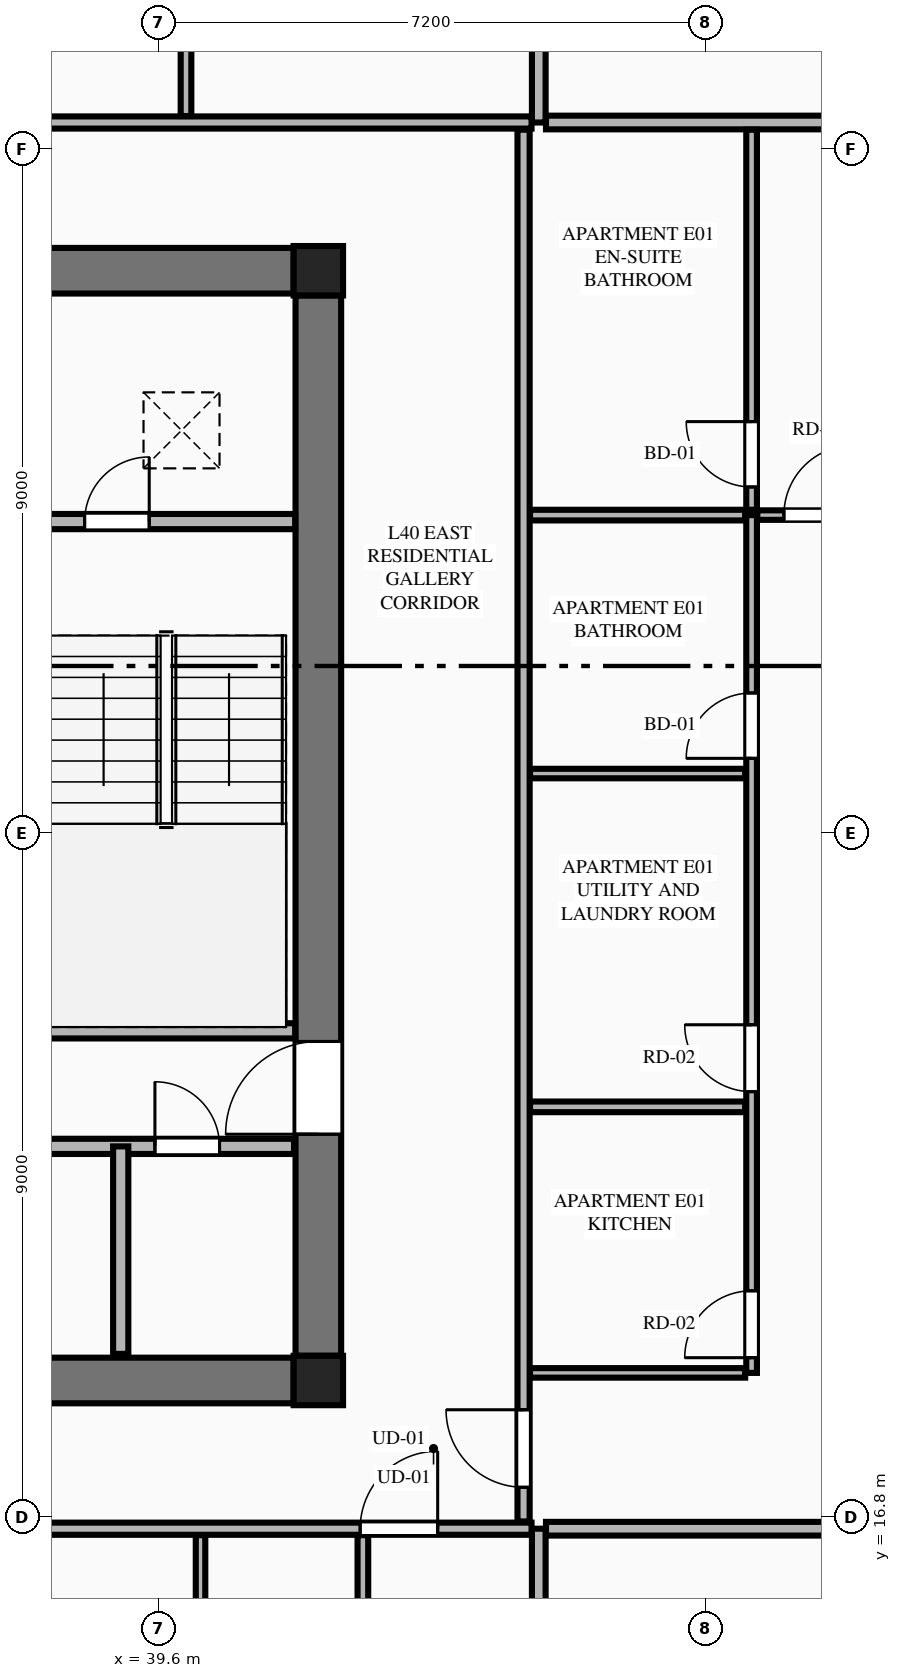
"""IFC4 building model, lengths in metres.
Left out: names, types, materials, properties, quantities, classifications, styles, units other than length and angle.
Written with IfcOpenShell. Run it as: python <this file> out.ifc"""

import sys

from ifc_helpers import new_model, si_unit, direction, frame, frame_2d, origin, origin_2d, place, context, subcontext, project, spatial, rectangle, extrude, element, fill, save


model = new_model("IFC4")
c1 = context("Model", 3, precision=1e-05, world=origin(), true_north=direction((0.0, 1.0)))
c2 = subcontext(c1, "Body", "Model", "MODEL_VIEW")
j1 = project(units=[si_unit("LENGTHUNIT", "METRE"), si_unit("PLANEANGLEUNIT", "RADIAN")], contexts=[c1])
p1 = place(None, origin())
s1 = spatial("IfcSite", under=j1, at=p1, CompositionType="ELEMENT")
p2 = place(p1, origin())
s2 = spatial("IfcBuilding", under=s1, at=p2, CompositionType="ELEMENT")
p3 = place(p2, frame((0.0, 0.0, 153.5)))
s3 = spatial("IfcBuildingStorey", under=s2, at=p3, CompositionType="ELEMENT", Elevation=153.5)
for number, where, z_axis, x_axis in (
    (1, (41.7, 18.6, 0.0), (0.0, 0.0, 1.0), (1.0, 0.0, 0.0)),
    (2, (41.7, 33.2, 0.0), (0.0, 0.0, 1.0), (1.0, 0.0, 0.0)),
):
    element("IfcColumn", number, at=place(p3, frame(where, z_axis=z_axis, x_axis=x_axis)), inside=s3, PredefinedType="COLUMN", context=c2, shape_type="SweptSolid", body=[
        extrude(rectangle(XDim=0.65, YDim=0.65, at=origin_2d()), origin(), (0.0, 0.0, 1.0), 3.55),
    ])
for number, where, z_axis, x_axis in (
    (3, (23.425, 18.6, 0.0), (0.0, 0.0, 1.0), (1.0, 0.0, 0.0)),
    (4, (23.425, 33.2, 0.0), (0.0, 0.0, 1.0), (1.0, 0.0, 0.0)),
):
    element("IfcWall", number, at=place(p3, frame(where, z_axis=z_axis, x_axis=x_axis)), inside=s3, PredefinedType="SHEAR", context=c2, shape_type="SweptSolid", body=[
        extrude(rectangle(XDim=17.95, YDim=0.6, at=frame_2d((8.975, 0.0))), origin(), (0.0, 0.0, 1.0), 3.34),
    ])
p4 = place(p3, frame((41.7, 18.925, 0.0), z_axis=(0.0, 0.0, 1.0), x_axis=(0.0, 1.0, 0.0)))
e5 = element("IfcWall", 5, at=p4, inside=s3, PredefinedType="SHEAR", context=c2, shape_type="SweptSolid", body=[
    extrude(rectangle(XDim=13.95, YDim=0.6, at=frame_2d((6.975, 0.0))), origin(), (0.0, 0.0, 1.0), 3.34),
])
p5 = place(p4, frame((2.915, 0.0, 0.0)))
e6 = element("IfcOpeningElement", 6, at=p5, cuts=e5, PredefinedType="OPENING", context=c2, shape_type="SweptSolid", body=[
    extrude(rectangle(XDim=1.22, YDim=2.25, at=frame_2d((0.61, 1.125))), frame((0.0, 0.31, 0.0), z_axis=(0.0, -1.0, 0.0), x_axis=(1.0, 0.0, 0.0)), (0.0, 0.0, 1.0), 0.62),
])
p6 = place(p3, frame((38.125, 23.2, 0.0), z_axis=(0.0, 0.0, 1.0), x_axis=(1.0, 0.0, 0.0)))
e7 = element("IfcWall", 7, at=p6, inside=s3, PredefinedType="PLUMBINGWALL", context=c2, shape_type="SweptSolid", body=[
    extrude(rectangle(XDim=3.27, YDim=0.2, at=frame_2d((1.635, 0.0))), origin(), (0.0, 0.0, 1.0), 3.34),
])
p7 = place(p3, frame((38.125, 29.9, 0.0), z_axis=(0.0, 0.0, 1.0), x_axis=(1.0, 0.0, 0.0)))
e8 = element("IfcWall", 8, at=p7, inside=s3, PredefinedType="PLUMBINGWALL", context=c2, shape_type="SweptSolid", body=[
    extrude(rectangle(XDim=3.27, YDim=0.2, at=frame_2d((1.635, 0.0))), origin(), (0.0, 0.0, 1.0), 3.34),
])
p8 = place(p7, frame((0.5, 0.0, 0.0)))
e9 = element("IfcOpeningElement", 9, at=p8, cuts=e8, PredefinedType="OPENING", context=c2, shape_type="SweptSolid", body=[
    extrude(rectangle(XDim=0.85, YDim=2.05, at=frame_2d((0.425, 1.025))), frame((0.0, 0.11, 0.0), z_axis=(0.0, -1.0, 0.0), x_axis=(1.0, 0.0, 0.0)), (0.0, 0.0, 1.0), 0.22),
])
p9 = place(p3, frame((23.42, 21.68, 0.0), z_axis=(0.0, 0.0, 1.0), x_axis=(1.0, 0.0, 0.0)))
e10 = element("IfcWall", 10, at=p9, inside=s3, PredefinedType="PLUMBINGWALL", context=c2, shape_type="SweptSolid", body=[
    extrude(rectangle(XDim=17.96, YDim=0.2, at=frame_2d((8.98, 0.0))), origin(), (0.0, 0.0, 1.0), 3.34),
])
p10 = place(p9, frame((11.6, 0.0, 0.0)))
e11 = element("IfcOpeningElement", 11, at=p10, cuts=e10, PredefinedType="OPENING", context=c2, shape_type="SweptSolid", body=[
    extrude(rectangle(XDim=1.1, YDim=2.2, at=frame_2d((0.55, 1.1))), frame((0.0, 0.11, 0.0), z_axis=(0.0, -1.0, 0.0), x_axis=(1.0, 0.0, 0.0)), (0.0, 0.0, 1.0), 0.22),
])
p11 = place(p9, frame((0.41, 0.0, 0.0)))
e12 = element("IfcOpeningElement", 12, at=p11, cuts=e10, PredefinedType="OPENING", context=c2, shape_type="SweptSolid", body=[
    extrude(rectangle(XDim=0.85, YDim=2.05, at=frame_2d((0.425, 1.025))), frame((0.0, 0.11, 0.0), z_axis=(0.0, -1.0, 0.0), x_axis=(1.0, 0.0, 0.0)), (0.0, 0.0, 1.0), 0.22),
])
p12 = place(p9, frame((4.13, 0.0, 0.0)))
e13 = element("IfcOpeningElement", 13, at=p12, cuts=e10, PredefinedType="OPENING", context=c2, shape_type="SweptSolid", body=[
    extrude(rectangle(XDim=0.85, YDim=2.05, at=frame_2d((0.425, 1.025))), frame((0.0, 0.11, 0.0), z_axis=(0.0, -1.0, 0.0), x_axis=(1.0, 0.0, 0.0)), (0.0, 0.0, 1.0), 0.22),
])
p13 = place(p9, frame((7.83, 0.0, 0.0)))
e14 = element("IfcOpeningElement", 14, at=p13, cuts=e10, PredefinedType="OPENING", context=c2, shape_type="SweptSolid", body=[
    extrude(rectangle(XDim=0.85, YDim=2.05, at=frame_2d((0.425, 1.025))), frame((0.0, 0.11, 0.0), z_axis=(0.0, -1.0, 0.0), x_axis=(1.0, 0.0, 0.0)), (0.0, 0.0, 1.0), 0.22),
])
p14 = place(p9, frame((13.78, 0.0, 0.0)))
e15 = element("IfcOpeningElement", 15, at=p14, cuts=e10, PredefinedType="OPENING", context=c2, shape_type="SweptSolid", body=[
    extrude(rectangle(XDim=0.85, YDim=2.05, at=frame_2d((0.425, 1.025))), frame((0.0, 0.11, 0.0), z_axis=(0.0, -1.0, 0.0), x_axis=(1.0, 0.0, 0.0)), (0.0, 0.0, 1.0), 0.22),
])
p15 = place(p9, frame((16.13, 0.0, 0.0)))
e16 = element("IfcOpeningElement", 16, at=p15, cuts=e10, PredefinedType="OPENING", context=c2, shape_type="SweptSolid", body=[
    extrude(rectangle(XDim=0.85, YDim=2.05, at=frame_2d((0.425, 1.025))), frame((0.0, 0.11, 0.0), z_axis=(0.0, -1.0, 0.0), x_axis=(1.0, 0.0, 0.0)), (0.0, 0.0, 1.0), 0.22),
])
p16 = place(p3, frame((39.1, 18.95, 0.0), z_axis=(0.0, 0.0, 1.0), x_axis=(0.0, 1.0, 0.0)))
e17 = element("IfcWall", 17, at=p16, inside=s3, PredefinedType="PLUMBINGWALL", context=c2, shape_type="SweptSolid", body=[
    extrude(rectangle(XDim=2.73, YDim=0.2, at=frame_2d((1.365, 0.0))), origin(), (0.0, 0.0, 1.0), 3.34),
])
p17 = place(p3, frame((44.6, 4.105, 0.0), z_axis=(0.0, 0.0, 1.0), x_axis=(0.0, 1.0, 0.0)))
e18 = element("IfcWall", 18, at=p17, inside=s3, PredefinedType="PARTITIONING", context=c2, shape_type="SweptSolid", body=[
    extrude(rectangle(XDim=12.545, YDim=0.18, at=frame_2d((6.272, 0.0))), origin(), (0.0, 0.0, 1.0), 3.34),
])
p18 = place(p3, frame((36.327, 16.65, 0.0), z_axis=(0.0, 0.0, 1.0), x_axis=(1.0, 0.0, 0.0)))
e19 = element("IfcWall", 19, at=p18, inside=s3, PredefinedType="PARTITIONING", context=c2, shape_type="SweptSolid", body=[
    extrude(rectangle(XDim=8.178, YDim=0.16, at=frame_2d((4.089, 0.0))), origin(), (0.0, 0.0, 1.0), 3.34),
])
p19 = place(p18, frame((5.923, 0.0, 0.0)))
e20 = element("IfcOpeningElement", 20, at=p19, cuts=e19, PredefinedType="OPENING", context=c2, shape_type="SweptSolid", body=[
    extrude(rectangle(XDim=1.02, YDim=2.25, at=frame_2d((0.51, 1.125))), frame((0.0, 0.09, 0.0), z_axis=(0.0, -1.0, 0.0), x_axis=(1.0, 0.0, 0.0)), (0.0, 0.0, 1.0), 0.18),
])
p20 = place(p3, frame((40.15, 9.981, 0.0), z_axis=(0.0, 0.0, 1.0), x_axis=(0.0, 1.0, 0.0)))
e21 = element("IfcWall", 21, at=p20, inside=s3, PredefinedType="PARTITIONING", context=c2, shape_type="SweptSolid", body=[
    extrude(rectangle(XDim=6.584, YDim=0.125, at=frame_2d((3.292, 0.0))), origin(), (0.0, 0.0, 1.0), 3.34),
])
p21 = place(p3, frame((42.286, 9.981, 0.0), z_axis=(0.0, 0.0, 1.0), x_axis=(0.0, 1.0, 0.0)))
e22 = element("IfcWall", 22, at=p21, inside=s3, PredefinedType="PLUMBINGWALL", context=c2, shape_type="SweptSolid", body=[
    extrude(rectangle(XDim=6.584, YDim=0.14, at=frame_2d((3.292, 0.0))), origin(), (0.0, 0.0, 1.0), 2.722),
])
p22 = place(p3, frame((44.6, 35.15, 0.0), z_axis=(0.0, 0.0, 1.0), x_axis=(0.0, 1.0, 0.0)))
e23 = element("IfcWall", 23, at=p22, inside=s3, PredefinedType="PARTITIONING", context=c2, shape_type="SweptSolid", body=[
    extrude(rectangle(XDim=12.345, YDim=0.18, at=frame_2d((6.173, 0.0))), origin(), (0.0, 0.0, 1.0), 3.34),
])
p23 = place(p3, frame((20.295, 35.15, 0.0), z_axis=(0.0, 0.0, 1.0), x_axis=(1.0, 0.0, 0.0)))
e24 = element("IfcWall", 24, at=p23, inside=s3, PredefinedType="PARTITIONING", context=c2, shape_type="SweptSolid", body=[
    extrude(rectangle(XDim=24.21, YDim=0.16, at=frame_2d((12.105, 0.0))), origin(), (0.0, 0.0, 1.0), 3.34),
])
p24 = place(p23, frame((0.405, 0.0, 0.0)))
e25 = element("IfcOpeningElement", 25, at=p24, cuts=e24, PredefinedType="OPENING", context=c2, shape_type="SweptSolid", body=[
    extrude(rectangle(XDim=1.35, YDim=2.35, at=frame_2d((0.675, 1.175))), frame((0.0, 0.09, 0.0), z_axis=(0.0, -1.0, 0.0), x_axis=(1.0, 0.0, 0.0)), (0.0, 0.0, 1.0), 0.18),
])
p25 = place(p3, frame((39.959, 35.235, 0.0), z_axis=(0.0, 0.0, 1.0), x_axis=(0.0, 1.0, 0.0)))
e26 = element("IfcWall", 26, at=p25, inside=s3, PredefinedType="PLUMBINGWALL", context=c2, shape_type="SweptSolid", body=[
    extrude(rectangle(XDim=4.625, YDim=0.14, at=frame_2d((2.312, 0.0))), origin(), (0.0, 0.0, 1.0), 3.34),
])
p26 = place(p3, frame((44.695, 16.65, 0.0), z_axis=(0.0, 0.0, 1.0), x_axis=(1.0, 0.0, 0.0)))
e27 = element("IfcWall", 27, at=p26, inside=s3, PredefinedType="PARTITIONING", context=c2, shape_type="SweptSolid", body=[
    extrude(rectangle(XDim=7.996, YDim=0.18, at=frame_2d((3.998, 0.0))), origin(), (0.0, 0.0, 1.0), 3.34),
])
p27 = place(p3, frame((44.695, 35.15, 0.0), z_axis=(0.0, 0.0, 1.0), x_axis=(1.0, 0.0, 0.0)))
e28 = element("IfcWall", 28, at=p27, inside=s3, PredefinedType="PARTITIONING", context=c2, shape_type="SweptSolid", body=[
    extrude(rectangle(XDim=7.895, YDim=0.18, at=frame_2d((3.948, 0.0))), origin(), (0.0, 0.0, 1.0), 3.34),
])
p28 = place(p3, frame((44.4, 16.745, 0.0), z_axis=(0.0, 0.0, 1.0), x_axis=(0.0, 1.0, 0.0)))
e29 = element("IfcWall", 29, at=p28, inside=s3, PredefinedType="PARTITIONING", context=c2, shape_type="SweptSolid", body=[
    extrude(rectangle(XDim=18.31, YDim=0.16, at=frame_2d((9.155, 0.0))), origin(), (0.0, 0.0, 1.0), 3.34),
])
p29 = place(p28, frame((0.45, 0.0, 0.0)))
e30 = element("IfcOpeningElement", 30, at=p29, cuts=e29, PredefinedType="OPENING", context=c2, shape_type="SweptSolid", body=[
    extrude(rectangle(XDim=1.02, YDim=2.25, at=frame_2d((0.51, 1.125))), frame((0.0, 0.09, 0.0), z_axis=(0.0, -1.0, 0.0), x_axis=(1.0, 0.0, 0.0)), (0.0, 0.0, 1.0), 0.18),
])
p30 = place(p3, frame((44.485, 18.7, 0.0), z_axis=(0.0, 0.0, 1.0), x_axis=(1.0, 0.0, 0.0)))
e31 = element("IfcWall", 31, at=p30, inside=s3, PredefinedType="PARTITIONING", context=c2, shape_type="SweptSolid", body=[
    extrude(rectangle(XDim=2.83, YDim=0.125, at=frame_2d((1.415, 0.0))), origin(), (0.0, 0.0, 1.0), 2.722),
])
p31 = place(p3, frame((47.4, 18.7, 0.0), z_axis=(0.0, 0.0, 1.0), x_axis=(0.0, 1.0, 0.0)))
e32 = element("IfcWall", 32, at=p31, inside=s3, PredefinedType="PLUMBINGWALL", context=c2, shape_type="SweptSolid", body=[
    extrude(rectangle(XDim=11.285, YDim=0.14, at=frame_2d((5.643, 0.0))), origin(), (0.0, 0.0, 1.0), 3.34),
])
p32 = place(p31, frame((0.2, 0.0, 0.0)))
e33 = element("IfcOpeningElement", 33, at=p32, cuts=e32, PredefinedType="OPENING", context=c2, shape_type="SweptSolid", body=[
    extrude(rectangle(XDim=0.88, YDim=2.15, at=frame_2d((0.44, 1.075))), frame((0.0, 0.08, 0.0), z_axis=(0.0, -1.0, 0.0), x_axis=(1.0, 0.0, 0.0)), (0.0, 0.0, 1.0), 0.16),
])
p33 = place(p31, frame((3.7, 0.0, 0.0)))
e34 = element("IfcOpeningElement", 34, at=p33, cuts=e32, PredefinedType="OPENING", context=c2, shape_type="SweptSolid", body=[
    extrude(rectangle(XDim=0.88, YDim=2.15, at=frame_2d((0.44, 1.075))), frame((0.0, 0.08, 0.0), z_axis=(0.0, -1.0, 0.0), x_axis=(1.0, 0.0, 0.0)), (0.0, 0.0, 1.0), 0.16),
])
p34 = place(p31, frame((8.085, 0.0, 0.0)))
e35 = element("IfcOpeningElement", 35, at=p34, cuts=e32, PredefinedType="OPENING", context=c2, shape_type="SweptSolid", body=[
    extrude(rectangle(XDim=0.86, YDim=2.1, at=frame_2d((0.43, 1.05))), frame((0.0, 0.08, 0.0), z_axis=(0.0, -1.0, 0.0), x_axis=(1.0, 0.0, 0.0)), (0.0, 0.0, 1.0), 0.16),
])
p35 = place(p3, frame((47.4, 30.055, 0.0), z_axis=(0.0, 0.0, 1.0), x_axis=(0.0, 1.0, 0.0)))
e36 = element("IfcWall", 36, at=p35, inside=s3, PredefinedType="PLUMBINGWALL", context=c2, shape_type="SweptSolid", body=[
    extrude(rectangle(XDim=5.0, YDim=0.14, at=frame_2d((2.5, 0.0))), origin(), (0.0, 0.0, 1.0), 3.34),
])
p36 = place(p35, frame((0.3, 0.0, 0.0)))
e37 = element("IfcOpeningElement", 37, at=p36, cuts=e36, PredefinedType="OPENING", context=c2, shape_type="SweptSolid", body=[
    extrude(rectangle(XDim=0.86, YDim=2.1, at=frame_2d((0.43, 1.05))), frame((0.0, 0.08, 0.0), z_axis=(0.0, -1.0, 0.0), x_axis=(1.0, 0.0, 0.0)), (0.0, 0.0, 1.0), 0.16),
])
p37 = place(p3, frame((44.485, 29.985, 0.0), z_axis=(0.0, 0.0, 1.0), x_axis=(1.0, 0.0, 0.0)))
e38 = element("IfcWall", 38, at=p37, inside=s3, PredefinedType="PLUMBINGWALL", context=c2, shape_type="SweptSolid", body=[
    extrude(rectangle(XDim=2.83, YDim=0.14, at=frame_2d((1.415, 0.0))), origin(), (0.0, 0.0, 1.0), 3.34),
])
p38 = place(p3, frame((47.475, 29.985, 0.0), z_axis=(0.0, 0.0, 1.0), x_axis=(1.0, 0.0, 0.0)))
e39 = element("IfcWall", 39, at=p38, inside=s3, PredefinedType="PARTITIONING", context=c2, shape_type="SweptSolid", body=[
    extrude(rectangle(XDim=7.743, YDim=0.125, at=frame_2d((3.872, 0.0))), origin(), (0.0, 0.0, 1.0), 3.34),
])
p39 = place(p38, frame((0.35, 0.0, 0.0)))
e40 = element("IfcOpeningElement", 40, at=p39, cuts=e39, PredefinedType="OPENING", context=c2, shape_type="SweptSolid", body=[
    extrude(rectangle(XDim=0.92, YDim=2.15, at=frame_2d((0.46, 1.075))), frame((0.0, 0.073, 0.0), z_axis=(0.0, -1.0, 0.0), x_axis=(1.0, 0.0, 0.0)), (0.0, 0.0, 1.0), 0.145),
])
p40 = place(p3, frame((44.485, 22.2, 0.0), z_axis=(0.0, 0.0, 1.0), x_axis=(1.0, 0.0, 0.0)))
e41 = element("IfcWall", 41, at=p40, inside=s3, PredefinedType="PLUMBINGWALL", context=c2, shape_type="SweptSolid", body=[
    extrude(rectangle(XDim=2.83, YDim=0.14, at=frame_2d((1.415, 0.0))), origin(), (0.0, 0.0, 1.0), 3.34),
])
p41 = place(p3, frame((44.485, 26.585, 0.0), z_axis=(0.0, 0.0, 1.0), x_axis=(1.0, 0.0, 0.0)))
e42 = element("IfcWall", 42, at=p41, inside=s3, PredefinedType="PARTITIONING", context=c2, shape_type="SweptSolid", body=[
    extrude(rectangle(XDim=2.83, YDim=0.125, at=frame_2d((1.415, 0.0))), origin(), (0.0, 0.0, 1.0), 3.34),
])
p42 = place(p5, origin())
e43 = element("IfcDoor", 43, at=p42, inside=s3, OperationType="SINGLE_SWING_LEFT", PredefinedType="DOOR", context=c2, shape_type="SweptSolid", body=[
    extrude(rectangle(XDim=1.22, YDim=2.25, at=frame_2d((0.61, 1.125))), frame((0.0, 0.025, 0.0), z_axis=(0.0, -1.0, 0.0), x_axis=(1.0, 0.0, 0.0)), (0.0, 0.0, 1.0), 0.05),
])
fill(e6, e43)
p43 = place(p8, origin())
e44 = element("IfcDoor", 44, at=p43, inside=s3, OperationType="SINGLE_SWING_RIGHT", PredefinedType="DOOR", context=c2, shape_type="SweptSolid", body=[
    extrude(rectangle(XDim=0.85, YDim=2.05, at=frame_2d((0.425, 1.025))), frame((0.0, 0.025, 0.0), z_axis=(0.0, -1.0, 0.0), x_axis=(1.0, 0.0, 0.0)), (0.0, 0.0, 1.0), 0.05),
])
fill(e9, e44)
p44 = place(p15, origin())
e45 = element("IfcDoor", 45, at=p44, inside=s3, OperationType="SINGLE_SWING_LEFT", PredefinedType="DOOR", context=c2, shape_type="SweptSolid", body=[
    extrude(rectangle(XDim=0.85, YDim=2.05, at=frame_2d((0.425, 1.025))), frame((0.0, 0.025, 0.0), z_axis=(0.0, -1.0, 0.0), x_axis=(1.0, 0.0, 0.0)), (0.0, 0.0, 1.0), 0.05),
])
fill(e16, e45)
p45 = place(p19, origin())
e46 = element("IfcDoor", 46, at=p45, inside=s3, OperationType="SINGLE_SWING_RIGHT", PredefinedType="DOOR", context=c2, shape_type="SweptSolid", body=[
    extrude(rectangle(XDim=1.02, YDim=2.25, at=frame_2d((0.51, 1.125))), frame((0.0, 0.025, 0.0), z_axis=(0.0, -1.0, 0.0), x_axis=(1.0, 0.0, 0.0)), (0.0, 0.0, 1.0), 0.05),
])
fill(e20, e46)
p46 = place(p32, origin())
e47 = element("IfcDoor", 47, at=p46, inside=s3, OperationType="SINGLE_SWING_LEFT", PredefinedType="DOOR", context=c2, shape_type="SweptSolid", body=[
    extrude(rectangle(XDim=0.88, YDim=2.15, at=frame_2d((0.44, 1.075))), frame((0.0, 0.025, 0.0), z_axis=(0.0, -1.0, 0.0), x_axis=(1.0, 0.0, 0.0)), (0.0, 0.0, 1.0), 0.05),
])
fill(e33, e47)
p47 = place(p33, origin())
e48 = element("IfcDoor", 48, at=p47, inside=s3, OperationType="SINGLE_SWING_RIGHT", PredefinedType="DOOR", context=c2, shape_type="SweptSolid", body=[
    extrude(rectangle(XDim=0.88, YDim=2.15, at=frame_2d((0.44, 1.075))), frame((0.0, 0.025, 0.0), z_axis=(0.0, -1.0, 0.0), x_axis=(1.0, 0.0, 0.0)), (0.0, 0.0, 1.0), 0.05),
])
fill(e34, e48)
p48 = place(p34, origin())
e49 = element("IfcDoor", 49, at=p48, inside=s3, OperationType="SINGLE_SWING_LEFT", PredefinedType="DOOR", context=c2, shape_type="SweptSolid", body=[
    extrude(rectangle(XDim=0.86, YDim=2.1, at=frame_2d((0.43, 1.05))), frame((0.0, 0.025, 0.0), z_axis=(0.0, -1.0, 0.0), x_axis=(1.0, 0.0, 0.0)), (0.0, 0.0, 1.0), 0.05),
])
fill(e35, e49)
p49 = place(p36, origin())
e50 = element("IfcDoor", 50, at=p49, inside=s3, OperationType="SINGLE_SWING_RIGHT", PredefinedType="DOOR", context=c2, shape_type="SweptSolid", body=[
    extrude(rectangle(XDim=0.86, YDim=2.1, at=frame_2d((0.43, 1.05))), frame((0.0, 0.025, 0.0), z_axis=(0.0, -1.0, 0.0), x_axis=(1.0, 0.0, 0.0)), (0.0, 0.0, 1.0), 0.05),
])
fill(e37, e50)
p50 = place(p29, origin())
e51 = element("IfcDoor", 51, at=p50, inside=s3, OperationType="SINGLE_SWING_RIGHT", PredefinedType="DOOR", context=c2, shape_type="SweptSolid", body=[
    extrude(rectangle(XDim=1.02, YDim=2.25, at=frame_2d((0.51, 1.125))), frame((0.0, 0.025, 0.0), z_axis=(0.0, -1.0, 0.0), x_axis=(1.0, 0.0, 0.0)), (0.0, 0.0, 1.0), 0.05),
])
fill(e30, e51)
p51 = place(p39, origin())
e52 = element("IfcDoor", 52, at=p51, inside=s3, OperationType="SINGLE_SWING_RIGHT", PredefinedType="DOOR", context=c2, shape_type="SweptSolid", body=[
    extrude(rectangle(XDim=0.92, YDim=2.15, at=frame_2d((0.46, 1.075))), frame((0.0, 0.025, 0.0), z_axis=(0.0, -1.0, 0.0), x_axis=(1.0, 0.0, 0.0)), (0.0, 0.0, 1.0), 0.05),
])
fill(e40, e52)
save(model, sys.argv[1])
